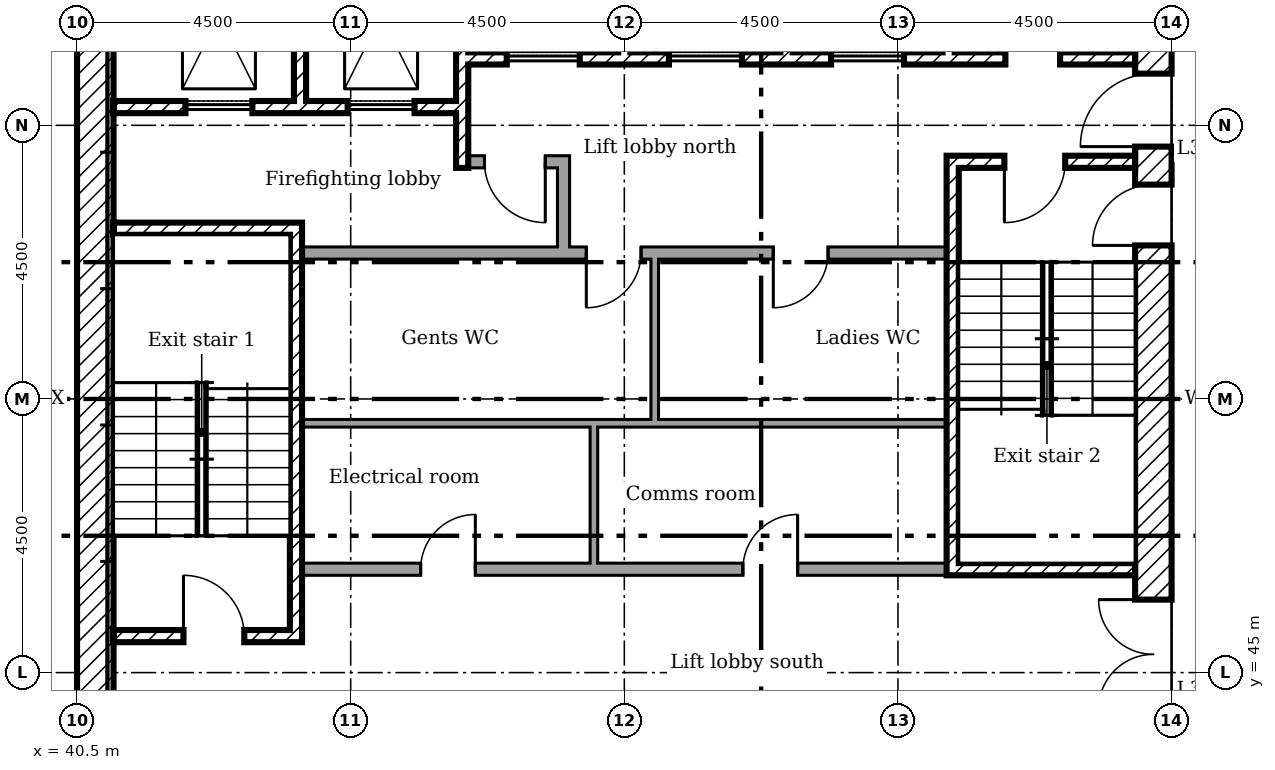
"""IFC4 building model, lengths in metres.
Left out: names, types, materials, properties, quantities, classifications, styles, units other than length and angle.
Written with IfcOpenShell. Run it as: python <this file> out.ifc"""

import sys

from ifc_helpers import new_model, si_unit, direction, frame, frame_2d, origin, place, context, subcontext, project, spatial, rectangle, extrude, element, fill, save


model = new_model("IFC4")
c1 = context("Model", 3, precision=1e-05, world=origin(), true_north=direction((0.0, 1.0)))
c2 = subcontext(c1, "Body", "Model", "MODEL_VIEW")
j1 = project(units=[si_unit("LENGTHUNIT", "METRE"), si_unit("PLANEANGLEUNIT", "RADIAN")], contexts=[c1])
p1 = place(None, origin())
s1 = spatial("IfcSite", under=j1, at=p1, CompositionType="ELEMENT")
p2 = place(p1, origin())
s2 = spatial("IfcBuilding", under=s1, at=p2, CompositionType="ELEMENT")
p3 = place(p2, frame((0.0, 0.0, 158.2)))
s3 = spatial("IfcBuildingStorey", under=s2, at=p3, CompositionType="ELEMENT", Elevation=158.2)
p4 = place(p3, frame((58.2, 40.5, 0.0), z_axis=(0.0, 0.0, 1.0), x_axis=(0.0, 1.0, 0.0)))
e1 = element("IfcWall", 1, at=p4, inside=s3, PredefinedType="SHEAR", context=c2, shape_type="SweptSolid", body=[
    extrude(rectangle(XDim=18.0, YDim=0.6, at=frame_2d((9.0, 0.0))), origin(), (0.0, 0.0, 1.0), 3.35),
])
p5 = place(p4, frame((13.15, 0.0, 0.0)))
e2 = element("IfcOpeningElement", 2, at=p5, cuts=e1, PredefinedType="OPENING", context=c2, shape_type="SweptSolid", body=[
    extrude(rectangle(XDim=1.2, YDim=2.1, at=frame_2d((0.6, 1.05))), frame((0.0, 0.31, 0.0), z_axis=(0.0, -1.0, 0.0), x_axis=(1.0, 0.0, 0.0)), (0.0, 0.0, 1.0), 0.62),
])
p6 = place(p4, frame((3.9, 0.0, 0.0)))
e3 = element("IfcOpeningElement", 3, at=p6, cuts=e1, PredefinedType="OPENING", context=c2, shape_type="SweptSolid", body=[
    extrude(rectangle(XDim=1.8, YDim=2.1, at=frame_2d((0.9, 1.05))), frame((0.0, 0.31, 0.0), z_axis=(0.0, -1.0, 0.0), x_axis=(1.0, 0.0, 0.0)), (0.0, 0.0, 1.0), 0.62),
])
p7 = place(p4, frame((11.525, 0.0, 0.0)))
e4 = element("IfcOpeningElement", 4, at=p7, cuts=e1, PredefinedType="OPENING", context=c2, shape_type="SweptSolid", body=[
    extrude(rectangle(XDim=1.0, YDim=2.1, at=frame_2d((0.5, 1.05))), frame((0.0, 0.31, 0.0), z_axis=(0.0, -1.0, 0.0), x_axis=(1.0, 0.0, 0.0)), (0.0, 0.0, 1.0), 0.62),
])
p8 = place(p3, frame((40.8, 41.1, 0.0), z_axis=(0.0, 0.0, 1.0), x_axis=(0.0, 1.0, 0.0)))
e5 = element("IfcWall", 5, at=p8, inside=s3, PredefinedType="SHEAR", context=c2, shape_type="SweptSolid", body=[
    extrude(rectangle(XDim=16.8, YDim=0.6, at=frame_2d((8.4, 0.0))), origin(), (0.0, 0.0, 1.0), 3.35),
])
p9 = place(p3, frame((44.167, 57.9, 0.0), z_axis=(0.0, 0.0, 1.0), x_axis=(0.0, -1.0, 0.0)))
e6 = element("IfcWall", 6, at=p9, inside=s3, PredefinedType="SHEAR", context=c2, shape_type="SweptSolid", body=[
    extrude(rectangle(XDim=3.5, YDim=0.2, at=frame_2d((1.75, 0.0))), origin(), (0.0, 0.0, 1.0), 3.35),
])
p10 = place(p3, frame((46.833, 57.9, 0.0), z_axis=(0.0, 0.0, 1.0), x_axis=(0.0, -1.0, 0.0)))
e7 = element("IfcWall", 7, at=p10, inside=s3, PredefinedType="SHEAR", context=c2, shape_type="SweptSolid", body=[
    extrude(rectangle(XDim=4.6, YDim=0.2, at=frame_2d((2.3, 0.0))), origin(), (0.0, 0.0, 1.0), 3.35),
])
for number, where, z_axis, x_axis in (
    (8, (49.5, 57.9, 0.0), (0.0, 0.0, 1.0), (0.0, -1.0, 0.0)),
    (9, (52.167, 57.9, 0.0), (0.0, 0.0, 1.0), (0.0, -1.0, 0.0)),
    (10, (54.833, 57.9, 0.0), (0.0, 0.0, 1.0), (0.0, -1.0, 0.0)),
):
    element("IfcWall", number, at=place(p3, frame(where, z_axis=z_axis, x_axis=x_axis)), inside=s3, PredefinedType="SHEAR", context=c2, shape_type="SweptSolid", body=[
        extrude(rectangle(XDim=2.7, YDim=0.2, at=frame_2d((1.35, 0.0))), origin(), (0.0, 0.0, 1.0), 3.35),
    ])
p11 = place(p3, frame((48.5, 51.9, 0.0), z_axis=(0.0, 0.0, 1.0), x_axis=(0.0, 1.0, 0.0)))
e11 = element("IfcWall", 11, at=p11, inside=s3, PredefinedType="PARTITIONING", context=c2, shape_type="SweptSolid", body=[
    extrude(rectangle(XDim=1.6, YDim=0.2, at=frame_2d((0.8, 0.0))), origin(), (0.0, 0.0, 1.0), 3.35),
])
p12 = place(p3, frame((46.933, 53.4, 0.0)))
e12 = element("IfcWall", 12, at=p12, inside=s3, PredefinedType="PARTITIONING", context=c2, shape_type="SweptSolid", body=[
    extrude(rectangle(XDim=1.467, YDim=0.2, at=frame_2d((0.733, 0.0))), origin(), (0.0, 0.0, 1.0), 3.35),
])
p13 = place(p12, frame((0.267, 0.0, 0.0)))
e13 = element("IfcOpeningElement", 13, at=p13, cuts=e12, PredefinedType="OPENING", context=c2, shape_type="SweptSolid", body=[
    extrude(rectangle(XDim=1.0, YDim=2.1, at=frame_2d((0.5, 1.05))), frame((0.0, 0.11, 0.0), z_axis=(0.0, -1.0, 0.0), x_axis=(1.0, 0.0, 0.0)), (0.0, 0.0, 1.0), 0.22),
])
p14 = place(p3, frame((46.933, 55.1, 0.0)))
e14 = element("IfcWall", 14, at=p14, inside=s3, PredefinedType="SHEAR", context=c2, shape_type="SweptSolid", body=[
    extrude(rectangle(XDim=10.967, YDim=0.2, at=frame_2d((5.483, 0.0))), origin(), (0.0, 0.0, 1.0), 3.35),
])
p15 = place(p14, frame((8.833, 0.0, 0.0)))
e15 = element("IfcOpeningElement", 15, at=p15, cuts=e14, PredefinedType="OPENING", context=c2, shape_type="SweptSolid", body=[
    extrude(rectangle(XDim=0.9, YDim=2.1, at=frame_2d((0.45, 1.05))), frame((0.0, 0.11, 0.0), z_axis=(0.0, -1.0, 0.0), x_axis=(1.0, 0.0, 0.0)), (0.0, 0.0, 1.0), 0.22),
])
p16 = place(p14, frame((0.633, 0.0, 0.0)))
e16 = element("IfcOpeningElement", 16, at=p16, cuts=e14, PredefinedType="OPENING", context=c2, shape_type="SweptSolid", body=[
    extrude(rectangle(XDim=1.2, YDim=2.1, at=frame_2d((0.6, 1.05))), frame((0.0, 0.11, 0.0), z_axis=(0.0, -1.0, 0.0), x_axis=(1.0, 0.0, 0.0)), (0.0, 0.0, 1.0), 0.22),
])
p17 = place(p14, frame((3.3, 0.0, 0.0)))
e17 = element("IfcOpeningElement", 17, at=p17, cuts=e14, PredefinedType="OPENING", context=c2, shape_type="SweptSolid", body=[
    extrude(rectangle(XDim=1.2, YDim=2.1, at=frame_2d((0.6, 1.05))), frame((0.0, 0.11, 0.0), z_axis=(0.0, -1.0, 0.0), x_axis=(1.0, 0.0, 0.0)), (0.0, 0.0, 1.0), 0.22),
])
p18 = place(p14, frame((5.967, 0.0, 0.0)))
e18 = element("IfcOpeningElement", 18, at=p18, cuts=e14, PredefinedType="OPENING", context=c2, shape_type="SweptSolid", body=[
    extrude(rectangle(XDim=1.2, YDim=2.1, at=frame_2d((0.6, 1.05))), frame((0.0, 0.11, 0.0), z_axis=(0.0, -1.0, 0.0), x_axis=(1.0, 0.0, 0.0)), (0.0, 0.0, 1.0), 0.22),
])
p19 = place(p3, frame((41.1, 54.3, 0.0)))
e19 = element("IfcWall", 19, at=p19, inside=s3, PredefinedType="SHEAR", context=c2, shape_type="SweptSolid", body=[
    extrude(rectangle(XDim=5.633, YDim=0.2, at=frame_2d((2.817, 0.0))), origin(), (0.0, 0.0, 1.0), 3.35),
])
p20 = place(p19, frame((1.183, 0.0, 0.0)))
e20 = element("IfcOpeningElement", 20, at=p20, cuts=e19, PredefinedType="OPENING", context=c2, shape_type="SweptSolid", body=[
    extrude(rectangle(XDim=1.1, YDim=2.1, at=frame_2d((0.55, 1.05))), frame((0.0, 0.11, 0.0), z_axis=(0.0, -1.0, 0.0), x_axis=(1.0, 0.0, 0.0)), (0.0, 0.0, 1.0), 0.22),
])
p21 = place(p19, frame((3.85, 0.0, 0.0)))
e21 = element("IfcOpeningElement", 21, at=p21, cuts=e19, PredefinedType="OPENING", context=c2, shape_type="SweptSolid", body=[
    extrude(rectangle(XDim=1.1, YDim=2.1, at=frame_2d((0.55, 1.05))), frame((0.0, 0.11, 0.0), z_axis=(0.0, -1.0, 0.0), x_axis=(1.0, 0.0, 0.0)), (0.0, 0.0, 1.0), 0.22),
])
p22 = place(p3, frame((44.1, 45.5, 0.0), z_axis=(0.0, 0.0, 1.0), x_axis=(0.0, 1.0, 0.0)))
e22 = element("IfcWall", 22, at=p22, inside=s3, PredefinedType="SHEAR", context=c2, shape_type="SweptSolid", body=[
    extrude(rectangle(XDim=6.9, YDim=0.2, at=frame_2d((3.45, 0.0))), origin(), (0.0, 0.0, 1.0), 3.35),
])
p23 = place(p3, frame((41.1, 52.3, 0.0)))
e23 = element("IfcWall", 23, at=p23, inside=s3, PredefinedType="SHEAR", context=c2, shape_type="SweptSolid", body=[
    extrude(rectangle(XDim=2.9, YDim=0.2, at=frame_2d((1.45, 0.0))), origin(), (0.0, 0.0, 1.0), 3.35),
])
p24 = place(p3, frame((41.1, 45.6, 0.0)))
e24 = element("IfcWall", 24, at=p24, inside=s3, PredefinedType="SHEAR", context=c2, shape_type="SweptSolid", body=[
    extrude(rectangle(XDim=2.9, YDim=0.2, at=frame_2d((1.45, 0.0))), origin(), (0.0, 0.0, 1.0), 3.35),
])
p25 = place(p24, frame((1.15, 0.0, 0.0)))
e25 = element("IfcOpeningElement", 25, at=p25, cuts=e24, PredefinedType="OPENING", context=c2, shape_type="SweptSolid", body=[
    extrude(rectangle(XDim=1.0, YDim=2.1, at=frame_2d((0.5, 1.05))), frame((0.0, 0.11, 0.0), z_axis=(0.0, -1.0, 0.0), x_axis=(1.0, 0.0, 0.0)), (0.0, 0.0, 1.0), 0.22),
])
p26 = place(p3, frame((54.8, 53.4, 0.0)))
e26 = element("IfcWall", 26, at=p26, inside=s3, PredefinedType="SHEAR", context=c2, shape_type="SweptSolid", body=[
    extrude(rectangle(XDim=3.1, YDim=0.2, at=frame_2d((1.55, 0.0))), origin(), (0.0, 0.0, 1.0), 3.35),
])
p27 = place(p26, frame((0.95, 0.0, 0.0)))
e27 = element("IfcOpeningElement", 27, at=p27, cuts=e26, PredefinedType="OPENING", context=c2, shape_type="SweptSolid", body=[
    extrude(rectangle(XDim=1.0, YDim=2.1, at=frame_2d((0.5, 1.05))), frame((0.0, 0.11, 0.0), z_axis=(0.0, -1.0, 0.0), x_axis=(1.0, 0.0, 0.0)), (0.0, 0.0, 1.0), 0.22),
])
p28 = place(p3, frame((54.8, 46.7, 0.0)))
e28 = element("IfcWall", 28, at=p28, inside=s3, PredefinedType="SHEAR", context=c2, shape_type="SweptSolid", body=[
    extrude(rectangle(XDim=3.1, YDim=0.2, at=frame_2d((1.55, 0.0))), origin(), (0.0, 0.0, 1.0), 3.35),
])
p29 = place(p3, frame((54.9, 46.8, 0.0), z_axis=(0.0, 0.0, 1.0), x_axis=(0.0, 1.0, 0.0)))
e29 = element("IfcWall", 29, at=p29, inside=s3, PredefinedType="SHEAR", context=c2, shape_type="SweptSolid", body=[
    extrude(rectangle(XDim=6.5, YDim=0.2, at=frame_2d((3.25, 0.0))), origin(), (0.0, 0.0, 1.0), 3.35),
])
p30 = place(p3, frame((44.2, 51.9, 0.0)))
e30 = element("IfcWall", 30, at=p30, inside=s3, PredefinedType="PARTITIONING", context=c2, shape_type="SweptSolid", body=[
    extrude(rectangle(XDim=10.6, YDim=0.2, at=frame_2d((5.3, 0.0))), origin(), (0.0, 0.0, 1.0), 3.35),
])
p31 = place(p30, frame((4.675, 0.0, 0.0)))
e31 = element("IfcOpeningElement", 31, at=p31, cuts=e30, PredefinedType="OPENING", context=c2, shape_type="SweptSolid", body=[
    extrude(rectangle(XDim=0.9, YDim=2.1, at=frame_2d((0.45, 1.05))), frame((0.0, 0.11, 0.0), z_axis=(0.0, -1.0, 0.0), x_axis=(1.0, 0.0, 0.0)), (0.0, 0.0, 1.0), 0.22),
])
p32 = place(p30, frame((7.75, 0.0, 0.0)))
e32 = element("IfcOpeningElement", 32, at=p32, cuts=e30, PredefinedType="OPENING", context=c2, shape_type="SweptSolid", body=[
    extrude(rectangle(XDim=0.9, YDim=2.1, at=frame_2d((0.45, 1.05))), frame((0.0, 0.11, 0.0), z_axis=(0.0, -1.0, 0.0), x_axis=(1.0, 0.0, 0.0)), (0.0, 0.0, 1.0), 0.22),
])
p33 = place(p3, frame((44.2, 46.7, 0.0)))
e33 = element("IfcWall", 33, at=p33, inside=s3, PredefinedType="PARTITIONING", context=c2, shape_type="SweptSolid", body=[
    extrude(rectangle(XDim=10.6, YDim=0.2, at=frame_2d((5.3, 0.0))), origin(), (0.0, 0.0, 1.0), 3.35),
])
p34 = place(p33, frame((1.95, 0.0, 0.0)))
e34 = element("IfcOpeningElement", 34, at=p34, cuts=e33, PredefinedType="OPENING", context=c2, shape_type="SweptSolid", body=[
    extrude(rectangle(XDim=0.9, YDim=2.1, at=frame_2d((0.45, 1.05))), frame((0.0, 0.11, 0.0), z_axis=(0.0, -1.0, 0.0), x_axis=(1.0, 0.0, 0.0)), (0.0, 0.0, 1.0), 0.22),
])
p35 = place(p33, frame((7.25, 0.0, 0.0)))
e35 = element("IfcOpeningElement", 35, at=p35, cuts=e33, PredefinedType="OPENING", context=c2, shape_type="SweptSolid", body=[
    extrude(rectangle(XDim=0.9, YDim=2.1, at=frame_2d((0.45, 1.05))), frame((0.0, 0.11, 0.0), z_axis=(0.0, -1.0, 0.0), x_axis=(1.0, 0.0, 0.0)), (0.0, 0.0, 1.0), 0.22),
])
p36 = place(p3, frame((49.0, 46.8, 0.0), z_axis=(0.0, 0.0, 1.0), x_axis=(0.0, 1.0, 0.0)))
e36 = element("IfcWall", 36, at=p36, inside=s3, PredefinedType="PARTITIONING", context=c2, shape_type="SweptSolid", body=[
    extrude(rectangle(XDim=2.363, YDim=0.125, at=frame_2d((1.181, 0.0))), origin(), (0.0, 0.0, 1.0), 3.35),
])
p37 = place(p3, frame((49.0, 49.1, 0.0), z_axis=(0.0, 0.0, 1.0), x_axis=(-1.0, 0.0, 0.0)))
e37 = element("IfcWall", 37, at=p37, inside=s3, PredefinedType="PARTITIONING", context=c2, shape_type="SweptSolid", body=[
    extrude(rectangle(XDim=4.8, YDim=0.125, at=frame_2d((2.4, 0.0))), origin(), (0.0, 0.0, 1.0), 3.35),
])
p38 = place(p3, frame((50.062, 49.1, 0.0), z_axis=(0.0, 0.0, 1.0), x_axis=(-1.0, 0.0, 0.0)))
e38 = element("IfcWall", 38, at=p38, inside=s3, PredefinedType="PARTITIONING", context=c2, shape_type="SweptSolid", body=[
    extrude(rectangle(XDim=1.0, YDim=0.125, at=frame_2d((0.5, 0.0))), origin(), (0.0, 0.0, 1.0), 3.35),
])
p39 = place(p3, frame((54.8, 49.1, 0.0), z_axis=(0.0, 0.0, 1.0), x_axis=(-1.0, 0.0, 0.0)))
e39 = element("IfcWall", 39, at=p39, inside=s3, PredefinedType="PARTITIONING", context=c2, shape_type="SweptSolid", body=[
    extrude(rectangle(XDim=4.8, YDim=0.125, at=frame_2d((2.4, 0.0))), origin(), (0.0, 0.0, 1.0), 3.35),
])
p40 = place(p3, frame((50.0, 49.163, 0.0), z_axis=(0.0, 0.0, 1.0), x_axis=(0.0, 1.0, 0.0)))
e40 = element("IfcWall", 40, at=p40, inside=s3, PredefinedType="PARTITIONING", context=c2, shape_type="SweptSolid", body=[
    extrude(rectangle(XDim=2.637, YDim=0.125, at=frame_2d((1.319, 0.0))), origin(), (0.0, 0.0, 1.0), 3.35),
])
p41 = place(p5, origin())
e41 = element("IfcDoor", 41, at=p41, inside=s3, OperationType="SINGLE_SWING_RIGHT", PredefinedType="DOOR", context=c2, shape_type="SweptSolid", body=[
    extrude(rectangle(XDim=1.2, YDim=2.1, at=frame_2d((0.6, 1.05))), frame((0.0, 0.025, 0.0), z_axis=(0.0, -1.0, 0.0), x_axis=(1.0, 0.0, 0.0)), (0.0, 0.0, 1.0), 0.05),
])
fill(e2, e41)
p42 = place(p6, origin())
e42 = element("IfcDoor", 42, at=p42, inside=s3, OperationType="DOUBLE_DOOR_SINGLE_SWING", PredefinedType="DOOR", context=c2, shape_type="SweptSolid", body=[
    extrude(rectangle(XDim=1.8, YDim=2.1, at=frame_2d((0.9, 1.05))), frame((0.0, 0.025, 0.0), z_axis=(0.0, -1.0, 0.0), x_axis=(1.0, 0.0, 0.0)), (0.0, 0.0, 1.0), 0.05),
])
fill(e3, e42)
p43 = place(p25, origin())
e43 = element("IfcDoor", 43, at=p43, inside=s3, OperationType="SINGLE_SWING_RIGHT", PredefinedType="DOOR", context=c2, shape_type="SweptSolid", body=[
    extrude(rectangle(XDim=1.0, YDim=2.1, at=frame_2d((0.5, 1.05))), frame((0.0, 0.025, 0.0), z_axis=(0.0, -1.0, 0.0), x_axis=(1.0, 0.0, 0.0)), (0.0, 0.0, 1.0), 0.05),
])
fill(e25, e43)
p44 = place(p27, frame((1.0, 0.0, 0.0), x_axis=(-1.0, 0.0, 0.0)))
e44 = element("IfcDoor", 44, at=p44, inside=s3, OperationType="SINGLE_SWING_LEFT", PredefinedType="DOOR", context=c2, shape_type="SweptSolid", body=[
    extrude(rectangle(XDim=1.0, YDim=2.1, at=frame_2d((0.5, 1.05))), frame((0.0, 0.025, 0.0), z_axis=(0.0, -1.0, 0.0), x_axis=(1.0, 0.0, 0.0)), (0.0, 0.0, 1.0), 0.05),
])
fill(e27, e44)
p45 = place(p7, origin())
e45 = element("IfcDoor", 45, at=p45, inside=s3, OperationType="SINGLE_SWING_RIGHT", PredefinedType="DOOR", context=c2, shape_type="SweptSolid", body=[
    extrude(rectangle(XDim=1.0, YDim=2.1, at=frame_2d((0.5, 1.05))), frame((0.0, 0.025, 0.0), z_axis=(0.0, -1.0, 0.0), x_axis=(1.0, 0.0, 0.0)), (0.0, 0.0, 1.0), 0.05),
])
fill(e4, e45)
p46 = place(p13, frame((1.0, 0.0, 0.0), x_axis=(-1.0, 0.0, 0.0)))
e46 = element("IfcDoor", 46, at=p46, inside=s3, OperationType="SINGLE_SWING_RIGHT", PredefinedType="DOOR", context=c2, shape_type="SweptSolid", body=[
    extrude(rectangle(XDim=1.0, YDim=2.1, at=frame_2d((0.5, 1.05))), frame((0.0, 0.025, 0.0), z_axis=(0.0, -1.0, 0.0), x_axis=(1.0, 0.0, 0.0)), (0.0, 0.0, 1.0), 0.05),
])
fill(e13, e46)
p47 = place(p15, origin())
e47 = element("IfcDoor", 47, at=p47, inside=s3, OperationType="SINGLE_SWING_RIGHT", PredefinedType="DOOR", context=c2, shape_type="SweptSolid", body=[
    extrude(rectangle(XDim=0.9, YDim=2.1, at=frame_2d((0.45, 1.05))), frame((0.0, 0.025, 0.0), z_axis=(0.0, -1.0, 0.0), x_axis=(1.0, 0.0, 0.0)), (0.0, 0.0, 1.0), 0.05),
])
fill(e15, e47)
p48 = place(p34, origin())
e48 = element("IfcDoor", 48, at=p48, inside=s3, OperationType="SINGLE_SWING_LEFT", PredefinedType="DOOR", context=c2, shape_type="SweptSolid", body=[
    extrude(rectangle(XDim=0.9, YDim=2.1, at=frame_2d((0.45, 1.05))), frame((0.0, 0.025, 0.0), z_axis=(0.0, -1.0, 0.0), x_axis=(1.0, 0.0, 0.0)), (0.0, 0.0, 1.0), 0.05),
])
fill(e34, e48)
p49 = place(p35, origin())
e49 = element("IfcDoor", 49, at=p49, inside=s3, OperationType="SINGLE_SWING_LEFT", PredefinedType="DOOR", context=c2, shape_type="SweptSolid", body=[
    extrude(rectangle(XDim=0.9, YDim=2.1, at=frame_2d((0.45, 1.05))), frame((0.0, 0.025, 0.0), z_axis=(0.0, -1.0, 0.0), x_axis=(1.0, 0.0, 0.0)), (0.0, 0.0, 1.0), 0.05),
])
fill(e35, e49)
p50 = place(p31, frame((0.9, 0.0, 0.0), x_axis=(-1.0, 0.0, 0.0)))
e50 = element("IfcDoor", 50, at=p50, inside=s3, OperationType="SINGLE_SWING_LEFT", PredefinedType="DOOR", context=c2, shape_type="SweptSolid", body=[
    extrude(rectangle(XDim=0.9, YDim=2.1, at=frame_2d((0.45, 1.05))), frame((0.0, 0.025, 0.0), z_axis=(0.0, -1.0, 0.0), x_axis=(1.0, 0.0, 0.0)), (0.0, 0.0, 1.0), 0.05),
])
fill(e31, e50)
p51 = place(p32, frame((0.9, 0.0, 0.0), x_axis=(-1.0, 0.0, 0.0)))
e51 = element("IfcDoor", 51, at=p51, inside=s3, OperationType="SINGLE_SWING_LEFT", PredefinedType="DOOR", context=c2, shape_type="SweptSolid", body=[
    extrude(rectangle(XDim=0.9, YDim=2.1, at=frame_2d((0.45, 1.05))), frame((0.0, 0.025, 0.0), z_axis=(0.0, -1.0, 0.0), x_axis=(1.0, 0.0, 0.0)), (0.0, 0.0, 1.0), 0.05),
])
fill(e32, e51)
p52 = place(p20, origin())
e52 = element("IfcDoor", 52, at=p52, inside=s3, OperationType="SLIDING_TO_LEFT", PredefinedType="DOOR", context=c2, shape_type="SweptSolid", body=[
    extrude(rectangle(XDim=1.1, YDim=2.1, at=frame_2d((0.55, 1.05))), frame((0.0, 0.025, 0.0), z_axis=(0.0, -1.0, 0.0), x_axis=(1.0, 0.0, 0.0)), (0.0, 0.0, 1.0), 0.05),
])
fill(e20, e52)
p53 = place(p21, origin())
e53 = element("IfcDoor", 53, at=p53, inside=s3, OperationType="SLIDING_TO_LEFT", PredefinedType="DOOR", context=c2, shape_type="SweptSolid", body=[
    extrude(rectangle(XDim=1.1, YDim=2.1, at=frame_2d((0.55, 1.05))), frame((0.0, 0.025, 0.0), z_axis=(0.0, -1.0, 0.0), x_axis=(1.0, 0.0, 0.0)), (0.0, 0.0, 1.0), 0.05),
])
fill(e21, e53)
p54 = place(p16, origin())
e54 = element("IfcDoor", 54, at=p54, inside=s3, OperationType="SLIDING_TO_LEFT", PredefinedType="DOOR", context=c2, shape_type="SweptSolid", body=[
    extrude(rectangle(XDim=1.2, YDim=2.1, at=frame_2d((0.6, 1.05))), frame((0.0, 0.025, 0.0), z_axis=(0.0, -1.0, 0.0), x_axis=(1.0, 0.0, 0.0)), (0.0, 0.0, 1.0), 0.05),
])
fill(e16, e54)
p55 = place(p17, origin())
e55 = element("IfcDoor", 55, at=p55, inside=s3, OperationType="SLIDING_TO_LEFT", PredefinedType="DOOR", context=c2, shape_type="SweptSolid", body=[
    extrude(rectangle(XDim=1.2, YDim=2.1, at=frame_2d((0.6, 1.05))), frame((0.0, 0.025, 0.0), z_axis=(0.0, -1.0, 0.0), x_axis=(1.0, 0.0, 0.0)), (0.0, 0.0, 1.0), 0.05),
])
fill(e17, e55)
p56 = place(p18, origin())
e56 = element("IfcDoor", 56, at=p56, inside=s3, OperationType="SLIDING_TO_LEFT", PredefinedType="DOOR", context=c2, shape_type="SweptSolid", body=[
    extrude(rectangle(XDim=1.2, YDim=2.1, at=frame_2d((0.6, 1.05))), frame((0.0, 0.025, 0.0), z_axis=(0.0, -1.0, 0.0), x_axis=(1.0, 0.0, 0.0)), (0.0, 0.0, 1.0), 0.05),
])
fill(e18, e56)
save(model, sys.argv[1])
